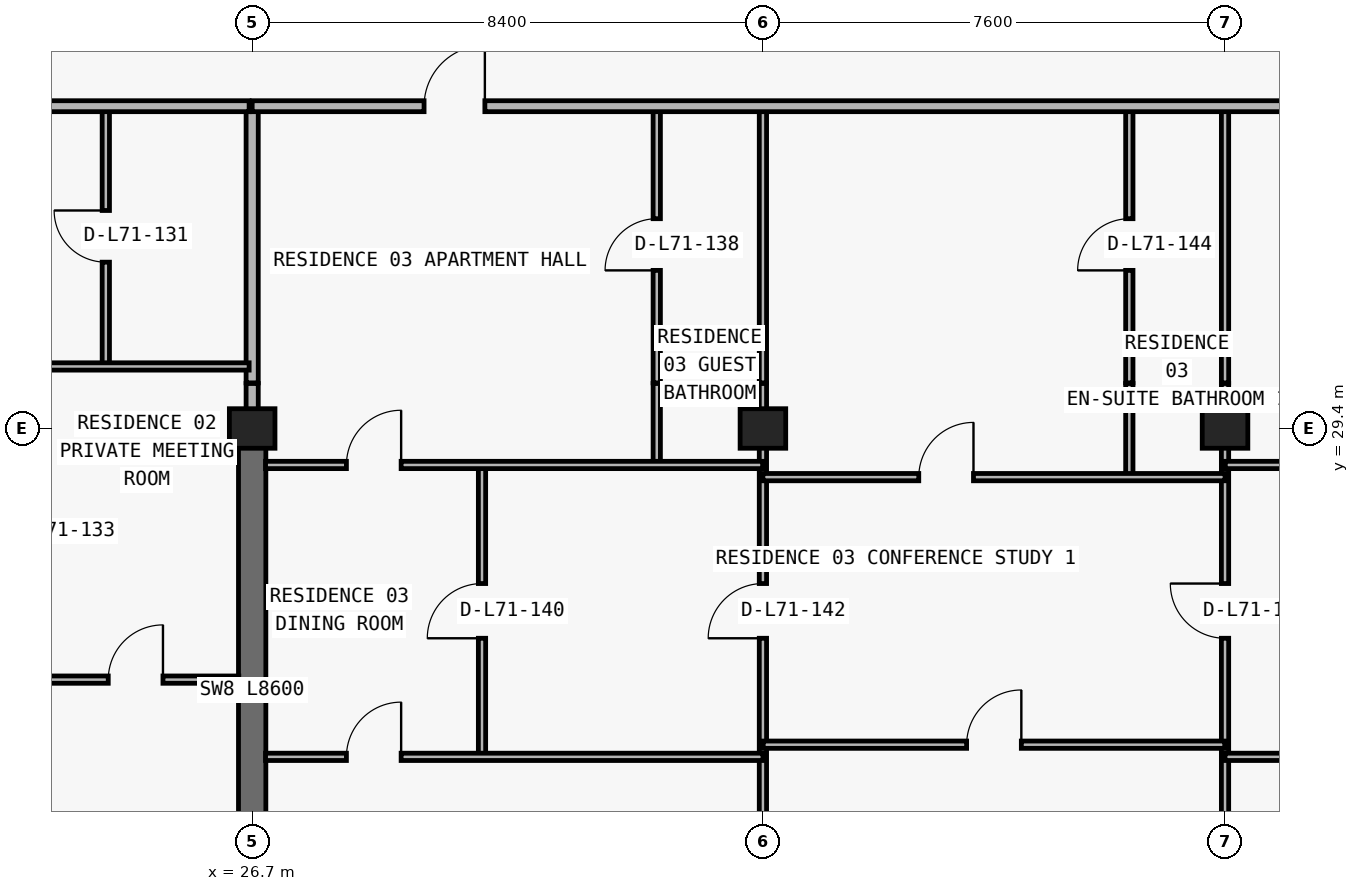
"""IFC4 building model, lengths in metres.
Left out: names, types, materials, properties, quantities, classifications, styles, units other than length and angle.
Written with IfcOpenShell. Run it as: python <this file> out.ifc"""

import sys

from ifc_helpers import new_model, si_unit, direction, frame, frame_2d, origin, origin_2d, place, context, subcontext, project, spatial, rectangle, extrude, element, fill, save


model = new_model("IFC4")
c1 = context("Model", 3, precision=1e-05, world=origin(), true_north=direction((0.0, 1.0)))
c2 = subcontext(c1, "Body", "Model", "MODEL_VIEW")
j1 = project(units=[si_unit("LENGTHUNIT", "METRE"), si_unit("PLANEANGLEUNIT", "RADIAN")], contexts=[c1])
p1 = place(None, origin())
s1 = spatial("IfcSite", under=j1, at=p1, CompositionType="ELEMENT")
p2 = place(p1, origin())
s2 = spatial("IfcBuilding", under=s1, at=p2, CompositionType="ELEMENT")
p3 = place(p2, frame((0.0, 0.0, 252.9)))
s3 = spatial("IfcBuildingStorey", under=s2, at=p3, CompositionType="ELEMENT", Elevation=252.9)
for number, where, z_axis, x_axis in (
    (1, (26.7, 29.4, 0.0), (0.0, 0.0, 1.0), (1.0, 0.0, 0.0)),
    (2, (35.1, 29.4, 0.0), (0.0, 0.0, 1.0), (1.0, 0.0, 0.0)),
    (3, (42.7, 29.4, 0.0), (0.0, 0.0, 1.0), (1.0, 0.0, 0.0)),
):
    element("IfcColumn", number, at=place(p3, frame(where, z_axis=z_axis, x_axis=x_axis)), inside=s3, PredefinedType="COLUMN", context=c2, shape_type="SweptSolid", body=[
        extrude(rectangle(XDim=0.75, YDim=0.65, at=origin_2d()), origin(), (0.0, 0.0, 1.0), 3.05),
    ])
p4 = place(p3, frame((26.7, 20.8, 0.0), z_axis=(0.0, 0.0, 1.0), x_axis=(0.0, 1.0, 0.0)))
e4 = element("IfcWall", 4, at=p4, inside=s3, PredefinedType="SHEAR", context=c2, shape_type="SweptSolid", body=[
    extrude(rectangle(XDim=8.6, YDim=0.45, at=frame_2d((4.3, 0.0))), origin(), (0.0, 0.0, 1.0), 3.05),
])
p5 = place(p3, frame((24.293, 30.42, 0.0), z_axis=(0.0, 0.0, 1.0), x_axis=(0.0, 1.0, 0.0)))
e5 = element("IfcWall", 5, at=p5, inside=s3, PredefinedType="PARTITIONING", context=c2, shape_type="SweptSolid", body=[
    extrude(rectangle(XDim=4.28, YDim=0.12, at=frame_2d((2.14, 0.0))), origin(), (0.0, 0.0, 1.0), 3.05),
])
p6 = place(p5, frame((1.715, 0.0, 0.0)))
e6 = element("IfcOpeningElement", 6, at=p6, cuts=e5, PredefinedType="OPENING", context=c2, shape_type="SweptSolid", body=[
    extrude(rectangle(XDim=0.85, YDim=2.1, at=frame_2d((0.425, 1.05))), frame((0.0, 0.07, 0.0), z_axis=(0.0, -1.0, 0.0), x_axis=(1.0, 0.0, 0.0)), (0.0, 0.0, 1.0), 0.14),
])
p7 = place(p3, frame((26.7, 29.405, 0.0), z_axis=(0.0, 0.0, 1.0), x_axis=(0.0, 1.0, 0.0)))
e7 = element("IfcWall", 7, at=p7, inside=s3, PredefinedType="PARTITIONING", context=c2, shape_type="SweptSolid", body=[
    extrude(rectangle(XDim=0.735, YDim=0.2, at=frame_2d((0.367, 0.0))), origin(), (0.0, 0.0, 1.0), 2.335),
])
p8 = place(p3, frame((26.7, 30.15, 0.0), z_axis=(0.0, 0.0, 1.0), x_axis=(0.0, 1.0, 0.0)))
e8 = element("IfcWall", 8, at=p8, inside=s3, PredefinedType="PARTITIONING", context=c2, shape_type="SweptSolid", body=[
    extrude(rectangle(XDim=4.55, YDim=0.2, at=frame_2d((2.275, 0.0))), origin(), (0.0, 0.0, 1.0), 2.335),
])
p9 = place(p3, frame((30.48, 24.0, 0.0), z_axis=(0.0, 0.0, 1.0), x_axis=(0.0, 1.0, 0.0)))
e9 = element("IfcWall", 9, at=p9, inside=s3, PredefinedType="PARTITIONING", context=c2, shape_type="SweptSolid", body=[
    extrude(rectangle(XDim=4.8, YDim=0.12, at=frame_2d((2.4, 0.0))), origin(), (0.0, 0.0, 1.0), 3.05),
])
p10 = place(p9, frame((1.95, 0.0, 0.0)))
e10 = element("IfcOpeningElement", 10, at=p10, cuts=e9, PredefinedType="OPENING", context=c2, shape_type="SweptSolid", body=[
    extrude(rectangle(XDim=0.9, YDim=2.15, at=frame_2d((0.45, 1.075))), frame((0.0, 0.07, 0.0), z_axis=(0.0, -1.0, 0.0), x_axis=(1.0, 0.0, 0.0)), (0.0, 0.0, 1.0), 0.14),
])
p11 = place(p3, frame((33.354, 28.8, 0.0), z_axis=(0.0, 0.0, 1.0), x_axis=(0.0, 1.0, 0.0)))
e11 = element("IfcWall", 11, at=p11, inside=s3, PredefinedType="PARTITIONING", context=c2, shape_type="SweptSolid", body=[
    extrude(rectangle(XDim=1.34, YDim=0.12, at=frame_2d((0.67, 0.0))), origin(), (0.0, 0.0, 1.0), 3.05),
])
p12 = place(p3, frame((33.354, 30.15, 0.0), z_axis=(0.0, 0.0, 1.0), x_axis=(0.0, 1.0, 0.0)))
e12 = element("IfcWall", 12, at=p12, inside=s3, PredefinedType="PARTITIONING", context=c2, shape_type="SweptSolid", body=[
    extrude(rectangle(XDim=4.55, YDim=0.12, at=frame_2d((2.275, 0.0))), origin(), (0.0, 0.0, 1.0), 3.05),
])
p13 = place(p12, frame((1.85, 0.0, 0.0)))
e13 = element("IfcOpeningElement", 13, at=p13, cuts=e12, PredefinedType="OPENING", context=c2, shape_type="SweptSolid", body=[
    extrude(rectangle(XDim=0.85, YDim=2.1, at=frame_2d((0.425, 1.05))), frame((0.0, 0.07, 0.0), z_axis=(0.0, -1.0, 0.0), x_axis=(1.0, 0.0, 0.0)), (0.0, 0.0, 1.0), 0.14),
])
p14 = place(p3, frame((35.1, 13.34, 0.0), z_axis=(0.0, 0.0, 1.0), x_axis=(0.0, 1.0, 0.0)))
e14 = element("IfcWall", 14, at=p14, inside=s3, PredefinedType="PARTITIONING", context=c2, shape_type="SweptSolid", body=[
    extrude(rectangle(XDim=16.8, YDim=0.12, at=frame_2d((8.4, 0.0))), origin(), (0.0, 0.0, 1.0), 2.263),
])
p15 = place(p14, frame((12.61, 0.0, 0.0)))
e15 = element("IfcOpeningElement", 15, at=p15, cuts=e14, PredefinedType="OPENING", context=c2, shape_type="SweptSolid", body=[
    extrude(rectangle(XDim=0.9, YDim=2.15, at=frame_2d((0.45, 1.075))), frame((0.0, 0.07, 0.0), z_axis=(0.0, -1.0, 0.0), x_axis=(1.0, 0.0, 0.0)), (0.0, 0.0, 1.0), 0.14),
])
p16 = place(p3, frame((35.1, 30.15, 0.0), z_axis=(0.0, 0.0, 1.0), x_axis=(0.0, 1.0, 0.0)))
e16 = element("IfcWall", 16, at=p16, inside=s3, PredefinedType="PARTITIONING", context=c2, shape_type="SweptSolid", body=[
    extrude(rectangle(XDim=4.55, YDim=0.12, at=frame_2d((2.275, 0.0))), origin(), (0.0, 0.0, 1.0), 2.263),
])
p17 = place(p3, frame((41.126, 28.6, 0.0), z_axis=(0.0, 0.0, 1.0), x_axis=(0.0, 1.0, 0.0)))
e17 = element("IfcWall", 17, at=p17, inside=s3, PredefinedType="PARTITIONING", context=c2, shape_type="SweptSolid", body=[
    extrude(rectangle(XDim=1.54, YDim=0.12, at=frame_2d((0.77, 0.0))), origin(), (0.0, 0.0, 1.0), 3.05),
])
p18 = place(p3, frame((41.126, 30.15, 0.0), z_axis=(0.0, 0.0, 1.0), x_axis=(0.0, 1.0, 0.0)))
e18 = element("IfcWall", 18, at=p18, inside=s3, PredefinedType="PARTITIONING", context=c2, shape_type="SweptSolid", body=[
    extrude(rectangle(XDim=4.55, YDim=0.12, at=frame_2d((2.275, 0.0))), origin(), (0.0, 0.0, 1.0), 3.05),
])
p19 = place(p18, frame((1.85, 0.0, 0.0)))
e19 = element("IfcOpeningElement", 19, at=p19, cuts=e18, PredefinedType="OPENING", context=c2, shape_type="SweptSolid", body=[
    extrude(rectangle(XDim=0.85, YDim=2.1, at=frame_2d((0.425, 1.05))), frame((0.0, 0.07, 0.0), z_axis=(0.0, -1.0, 0.0), x_axis=(1.0, 0.0, 0.0)), (0.0, 0.0, 1.0), 0.14),
])
p20 = place(p3, frame((42.7, 13.34, 0.0), z_axis=(0.0, 0.0, 1.0), x_axis=(0.0, 1.0, 0.0)))
e20 = element("IfcWall", 20, at=p20, inside=s3, PredefinedType="PARTITIONING", context=c2, shape_type="SweptSolid", body=[
    extrude(rectangle(XDim=16.8, YDim=0.12, at=frame_2d((8.4, 0.0))), origin(), (0.0, 0.0, 1.0), 2.263),
])
p21 = place(p20, frame((12.61, 0.0, 0.0)))
e21 = element("IfcOpeningElement", 21, at=p21, cuts=e20, PredefinedType="OPENING", context=c2, shape_type="SweptSolid", body=[
    extrude(rectangle(XDim=0.9, YDim=2.15, at=frame_2d((0.45, 1.075))), frame((0.0, 0.07, 0.0), z_axis=(0.0, -1.0, 0.0), x_axis=(1.0, 0.0, 0.0)), (0.0, 0.0, 1.0), 0.14),
])
p22 = place(p3, frame((42.7, 30.15, 0.0), z_axis=(0.0, 0.0, 1.0), x_axis=(0.0, 1.0, 0.0)))
e22 = element("IfcWall", 22, at=p22, inside=s3, PredefinedType="PARTITIONING", context=c2, shape_type="SweptSolid", body=[
    extrude(rectangle(XDim=4.55, YDim=0.12, at=frame_2d((2.275, 0.0))), origin(), (0.0, 0.0, 1.0), 2.263),
])
p23 = place(p3, frame((26.92, 24.0, 0.0), z_axis=(0.0, 0.0, 1.0), x_axis=(1.0, 0.0, 0.0)))
e23 = element("IfcWall", 23, at=p23, inside=s3, PredefinedType="PARTITIONING", context=c2, shape_type="SweptSolid", body=[
    extrude(rectangle(XDim=8.18, YDim=0.12, at=frame_2d((4.09, 0.0))), origin(), (0.0, 0.0, 1.0), 3.05),
])
p24 = place(p23, frame((1.33, 0.0, 0.0)))
e24 = element("IfcOpeningElement", 24, at=p24, cuts=e23, PredefinedType="OPENING", context=c2, shape_type="SweptSolid", body=[
    extrude(rectangle(XDim=0.9, YDim=2.15, at=frame_2d((0.45, 1.075))), frame((0.0, 0.07, 0.0), z_axis=(0.0, -1.0, 0.0), x_axis=(1.0, 0.0, 0.0)), (0.0, 0.0, 1.0), 0.14),
])
p25 = place(p3, frame((42.7, 24.0, 0.0), z_axis=(0.0, 0.0, 1.0), x_axis=(1.0, 0.0, 0.0)))
e25 = element("IfcWall", 25, at=p25, inside=s3, PredefinedType="PARTITIONING", context=c2, shape_type="SweptSolid", body=[
    extrude(rectangle(XDim=8.18, YDim=0.12, at=frame_2d((4.09, 0.0))), origin(), (0.0, 0.0, 1.0), 3.05),
])
p26 = place(p25, frame((3.64, 0.0, 0.0)))
e26 = element("IfcOpeningElement", 26, at=p26, cuts=e25, PredefinedType="OPENING", context=c2, shape_type="SweptSolid", body=[
    extrude(rectangle(XDim=0.9, YDim=2.15, at=frame_2d((0.45, 1.075))), frame((0.0, 0.07, 0.0), z_axis=(0.0, -1.0, 0.0), x_axis=(1.0, 0.0, 0.0)), (0.0, 0.0, 1.0), 0.14),
])
p27 = place(p3, frame((35.105, 24.2, 0.0), z_axis=(0.0, 0.0, 1.0), x_axis=(1.0, 0.0, 0.0)))
e27 = element("IfcWall", 27, at=p27, inside=s3, PredefinedType="PARTITIONING", context=c2, shape_type="SweptSolid", body=[
    extrude(rectangle(XDim=7.59, YDim=0.12, at=frame_2d((3.795, 0.0))), origin(), (0.0, 0.0, 1.0), 3.05),
])
p28 = place(p27, frame((3.345, 0.0, 0.0)))
e28 = element("IfcOpeningElement", 28, at=p28, cuts=e27, PredefinedType="OPENING", context=c2, shape_type="SweptSolid", body=[
    extrude(rectangle(XDim=0.9, YDim=2.15, at=frame_2d((0.45, 1.075))), frame((0.0, 0.07, 0.0), z_axis=(0.0, -1.0, 0.0), x_axis=(1.0, 0.0, 0.0)), (0.0, 0.0, 1.0), 0.14),
])
p29 = place(p3, frame((18.3, 25.27, 0.0), z_axis=(0.0, 0.0, 1.0), x_axis=(1.0, 0.0, 0.0)))
e29 = element("IfcWall", 29, at=p29, inside=s3, PredefinedType="PARTITIONING", context=c2, shape_type="SweptSolid", body=[
    extrude(rectangle(XDim=8.18, YDim=0.12, at=frame_2d((4.09, 0.0))), origin(), (0.0, 0.0, 1.0), 3.05),
])
p30 = place(p29, frame((1.86, 0.0, 0.0)))
e30 = element("IfcOpeningElement", 30, at=p30, cuts=e29, PredefinedType="OPENING", context=c2, shape_type="SweptSolid", body=[
    extrude(rectangle(XDim=0.9, YDim=2.15, at=frame_2d((0.45, 1.075))), frame((0.0, 0.07, 0.0), z_axis=(0.0, -1.0, 0.0), x_axis=(1.0, 0.0, 0.0)), (0.0, 0.0, 1.0), 0.14),
])
p31 = place(p29, frame((6.033, 0.0, 0.0)))
e31 = element("IfcOpeningElement", 31, at=p31, cuts=e29, PredefinedType="OPENING", context=c2, shape_type="SweptSolid", body=[
    extrude(rectangle(XDim=0.9, YDim=2.15, at=frame_2d((0.45, 1.075))), frame((0.0, 0.07, 0.0), z_axis=(0.0, -1.0, 0.0), x_axis=(1.0, 0.0, 0.0)), (0.0, 0.0, 1.0), 0.14),
])
p32 = place(p3, frame((35.1, 28.6, 0.0), z_axis=(0.0, 0.0, 1.0), x_axis=(1.0, 0.0, 0.0)))
e32 = element("IfcWall", 32, at=p32, inside=s3, PredefinedType="PARTITIONING", context=c2, shape_type="SweptSolid", body=[
    extrude(rectangle(XDim=7.6, YDim=0.12, at=frame_2d((3.8, 0.0))), origin(), (0.0, 0.0, 1.0), 3.05),
])
p33 = place(p32, frame((2.563, 0.0, 0.0)))
e33 = element("IfcOpeningElement", 33, at=p33, cuts=e32, PredefinedType="OPENING", context=c2, shape_type="SweptSolid", body=[
    extrude(rectangle(XDim=0.9, YDim=2.15, at=frame_2d((0.45, 1.075))), frame((0.0, 0.07, 0.0), z_axis=(0.0, -1.0, 0.0), x_axis=(1.0, 0.0, 0.0)), (0.0, 0.0, 1.0), 0.14),
])
p34 = place(p3, frame((26.92, 28.8, 0.0), z_axis=(0.0, 0.0, 1.0), x_axis=(1.0, 0.0, 0.0)))
e34 = element("IfcWall", 34, at=p34, inside=s3, PredefinedType="PARTITIONING", context=c2, shape_type="SweptSolid", body=[
    extrude(rectangle(XDim=8.175, YDim=0.12, at=frame_2d((4.087, 0.0))), origin(), (0.0, 0.0, 1.0), 3.05),
])
p35 = place(p34, frame((1.33, 0.0, 0.0)))
e35 = element("IfcOpeningElement", 35, at=p35, cuts=e34, PredefinedType="OPENING", context=c2, shape_type="SweptSolid", body=[
    extrude(rectangle(XDim=0.9, YDim=2.15, at=frame_2d((0.45, 1.075))), frame((0.0, 0.07, 0.0), z_axis=(0.0, -1.0, 0.0), x_axis=(1.0, 0.0, 0.0)), (0.0, 0.0, 1.0), 0.14),
])
p36 = place(p3, frame((42.705, 28.8, 0.0), z_axis=(0.0, 0.0, 1.0), x_axis=(1.0, 0.0, 0.0)))
e36 = element("IfcWall", 36, at=p36, inside=s3, PredefinedType="PARTITIONING", context=c2, shape_type="SweptSolid", body=[
    extrude(rectangle(XDim=8.175, YDim=0.12, at=frame_2d((4.087, 0.0))), origin(), (0.0, 0.0, 1.0), 3.05),
])
p37 = place(p36, frame((2.892, 0.0, 0.0)))
e37 = element("IfcOpeningElement", 37, at=p37, cuts=e36, PredefinedType="OPENING", context=c2, shape_type="SweptSolid", body=[
    extrude(rectangle(XDim=0.9, YDim=2.15, at=frame_2d((0.45, 1.075))), frame((0.0, 0.07, 0.0), z_axis=(0.0, -1.0, 0.0), x_axis=(1.0, 0.0, 0.0)), (0.0, 0.0, 1.0), 0.14),
])
p38 = place(p3, frame((18.3, 30.42, 0.0), z_axis=(0.0, 0.0, 1.0), x_axis=(1.0, 0.0, 0.0)))
e38 = element("IfcWall", 38, at=p38, inside=s3, PredefinedType="PARTITIONING", context=c2, shape_type="SweptSolid", body=[
    extrude(rectangle(XDim=8.35, YDim=0.12, at=frame_2d((4.175, 0.0))), origin(), (0.0, 0.0, 1.0), 3.05),
])
p39 = place(p38, frame((1.943, 0.0, 0.0)))
e39 = element("IfcOpeningElement", 39, at=p39, cuts=e38, PredefinedType="OPENING", context=c2, shape_type="SweptSolid", body=[
    extrude(rectangle(XDim=0.9, YDim=2.15, at=frame_2d((0.45, 1.075))), frame((0.0, 0.07, 0.0), z_axis=(0.0, -1.0, 0.0), x_axis=(1.0, 0.0, 0.0)), (0.0, 0.0, 1.0), 0.14),
])
p40 = place(p3, frame((12.105, 34.7, 0.0), z_axis=(0.0, 0.0, 1.0), x_axis=(1.0, 0.0, 0.0)))
e40 = element("IfcWall", 40, at=p40, inside=s3, PredefinedType="PARTITIONING", context=c2, shape_type="SweptSolid", body=[
    extrude(rectangle(XDim=14.545, YDim=0.18, at=frame_2d((7.272, 0.0))), origin(), (0.0, 0.0, 1.0), 3.05),
])
p41 = place(p40, frame((1.545, 0.0, 0.0)))
e41 = element("IfcOpeningElement", 41, at=p41, cuts=e40, PredefinedType="OPENING", context=c2, shape_type="SweptSolid", body=[
    extrude(rectangle(XDim=1.0, YDim=2.2, at=frame_2d((0.5, 1.1))), frame((0.0, 0.1, 0.0), z_axis=(0.0, -1.0, 0.0), x_axis=(1.0, 0.0, 0.0)), (0.0, 0.0, 1.0), 0.2),
])
p42 = place(p40, frame((8.691, 0.0, 0.0)))
e42 = element("IfcOpeningElement", 42, at=p42, cuts=e40, PredefinedType="OPENING", context=c2, shape_type="SweptSolid", body=[
    extrude(rectangle(XDim=1.0, YDim=2.2, at=frame_2d((0.5, 1.1))), frame((0.0, 0.1, 0.0), z_axis=(0.0, -1.0, 0.0), x_axis=(1.0, 0.0, 0.0)), (0.0, 0.0, 1.0), 0.2),
])
p43 = place(p3, frame((26.7, 34.7, 0.0), z_axis=(0.0, 0.0, 1.0), x_axis=(1.0, 0.0, 0.0)))
e43 = element("IfcWall", 43, at=p43, inside=s3, PredefinedType="PARTITIONING", context=c2, shape_type="SweptSolid", body=[
    extrude(rectangle(XDim=39.0, YDim=0.18, at=frame_2d((19.5, 0.0))), origin(), (0.0, 0.0, 1.0), 3.05),
])
p44 = place(p43, frame((2.827, 0.0, 0.0)))
e44 = element("IfcOpeningElement", 44, at=p44, cuts=e43, PredefinedType="OPENING", context=c2, shape_type="SweptSolid", body=[
    extrude(rectangle(XDim=1.0, YDim=2.2, at=frame_2d((0.5, 1.1))), frame((0.0, 0.1, 0.0), z_axis=(0.0, -1.0, 0.0), x_axis=(1.0, 0.0, 0.0)), (0.0, 0.0, 1.0), 0.2),
])
p45 = place(p43, frame((27.27, 0.0, 0.0)))
e45 = element("IfcOpeningElement", 45, at=p45, cuts=e43, PredefinedType="OPENING", context=c2, shape_type="SweptSolid", body=[
    extrude(rectangle(XDim=1.0, YDim=2.2, at=frame_2d((0.5, 1.1))), frame((0.0, 0.1, 0.0), z_axis=(0.0, -1.0, 0.0), x_axis=(1.0, 0.0, 0.0)), (0.0, 0.0, 1.0), 0.2),
])
p46 = place(p6, origin())
e46 = element("IfcDoor", 46, at=p46, inside=s3, OperationType="SINGLE_SWING_RIGHT", PredefinedType="DOOR", context=c2, shape_type="SweptSolid", body=[
    extrude(rectangle(XDim=0.85, YDim=2.1, at=frame_2d((0.425, 1.05))), frame((0.0, 0.025, 0.0), z_axis=(0.0, -1.0, 0.0), x_axis=(1.0, 0.0, 0.0)), (0.0, 0.0, 1.0), 0.05),
])
fill(e6, e46)
p47 = place(p31, origin())
e47 = element("IfcDoor", 47, at=p47, inside=s3, OperationType="SINGLE_SWING_RIGHT", PredefinedType="DOOR", context=c2, shape_type="SweptSolid", body=[
    extrude(rectangle(XDim=0.9, YDim=2.15, at=frame_2d((0.45, 1.075))), frame((0.0, 0.025, 0.0), z_axis=(0.0, -1.0, 0.0), x_axis=(1.0, 0.0, 0.0)), (0.0, 0.0, 1.0), 0.05),
])
fill(e31, e47)
p48 = place(p44, origin())
e48 = element("IfcDoor", 48, at=p48, inside=s3, OperationType="SINGLE_SWING_RIGHT", PredefinedType="DOOR", context=c2, shape_type="SweptSolid", body=[
    extrude(rectangle(XDim=1.0, YDim=2.2, at=frame_2d((0.5, 1.1))), frame((0.0, 0.025, 0.0), z_axis=(0.0, -1.0, 0.0), x_axis=(1.0, 0.0, 0.0)), (0.0, 0.0, 1.0), 0.05),
])
fill(e44, e48)
p49 = place(p13, origin())
e49 = element("IfcDoor", 49, at=p49, inside=s3, OperationType="SINGLE_SWING_LEFT", PredefinedType="DOOR", context=c2, shape_type="SweptSolid", body=[
    extrude(rectangle(XDim=0.85, YDim=2.1, at=frame_2d((0.425, 1.05))), frame((0.0, 0.025, 0.0), z_axis=(0.0, -1.0, 0.0), x_axis=(1.0, 0.0, 0.0)), (0.0, 0.0, 1.0), 0.05),
])
fill(e13, e49)
p50 = place(p35, origin())
e50 = element("IfcDoor", 50, at=p50, inside=s3, OperationType="SINGLE_SWING_RIGHT", PredefinedType="DOOR", context=c2, shape_type="SweptSolid", body=[
    extrude(rectangle(XDim=0.9, YDim=2.15, at=frame_2d((0.45, 1.075))), frame((0.0, 0.025, 0.0), z_axis=(0.0, -1.0, 0.0), x_axis=(1.0, 0.0, 0.0)), (0.0, 0.0, 1.0), 0.05),
])
fill(e35, e50)
p51 = place(p10, origin())
e51 = element("IfcDoor", 51, at=p51, inside=s3, OperationType="SINGLE_SWING_LEFT", PredefinedType="DOOR", context=c2, shape_type="SweptSolid", body=[
    extrude(rectangle(XDim=0.9, YDim=2.15, at=frame_2d((0.45, 1.075))), frame((0.0, 0.025, 0.0), z_axis=(0.0, -1.0, 0.0), x_axis=(1.0, 0.0, 0.0)), (0.0, 0.0, 1.0), 0.05),
])
fill(e10, e51)
p52 = place(p24, origin())
e52 = element("IfcDoor", 52, at=p52, inside=s3, OperationType="SINGLE_SWING_RIGHT", PredefinedType="DOOR", context=c2, shape_type="SweptSolid", body=[
    extrude(rectangle(XDim=0.9, YDim=2.15, at=frame_2d((0.45, 1.075))), frame((0.0, 0.025, 0.0), z_axis=(0.0, -1.0, 0.0), x_axis=(1.0, 0.0, 0.0)), (0.0, 0.0, 1.0), 0.05),
])
fill(e24, e52)
p53 = place(p15, origin())
e53 = element("IfcDoor", 53, at=p53, inside=s3, OperationType="SINGLE_SWING_LEFT", PredefinedType="DOOR", context=c2, shape_type="SweptSolid", body=[
    extrude(rectangle(XDim=0.9, YDim=2.15, at=frame_2d((0.45, 1.075))), frame((0.0, 0.025, 0.0), z_axis=(0.0, -1.0, 0.0), x_axis=(1.0, 0.0, 0.0)), (0.0, 0.0, 1.0), 0.05),
])
fill(e15, e53)
p54 = place(p33, origin())
e54 = element("IfcDoor", 54, at=p54, inside=s3, OperationType="SINGLE_SWING_RIGHT", PredefinedType="DOOR", context=c2, shape_type="SweptSolid", body=[
    extrude(rectangle(XDim=0.9, YDim=2.15, at=frame_2d((0.45, 1.075))), frame((0.0, 0.025, 0.0), z_axis=(0.0, -1.0, 0.0), x_axis=(1.0, 0.0, 0.0)), (0.0, 0.0, 1.0), 0.05),
])
fill(e33, e54)
p55 = place(p19, origin())
e55 = element("IfcDoor", 55, at=p55, inside=s3, OperationType="SINGLE_SWING_LEFT", PredefinedType="DOOR", context=c2, shape_type="SweptSolid", body=[
    extrude(rectangle(XDim=0.85, YDim=2.1, at=frame_2d((0.425, 1.05))), frame((0.0, 0.025, 0.0), z_axis=(0.0, -1.0, 0.0), x_axis=(1.0, 0.0, 0.0)), (0.0, 0.0, 1.0), 0.05),
])
fill(e19, e55)
p56 = place(p28, origin())
e56 = element("IfcDoor", 56, at=p56, inside=s3, OperationType="SINGLE_SWING_RIGHT", PredefinedType="DOOR", context=c2, shape_type="SweptSolid", body=[
    extrude(rectangle(XDim=0.9, YDim=2.15, at=frame_2d((0.45, 1.075))), frame((0.0, 0.025, 0.0), z_axis=(0.0, -1.0, 0.0), x_axis=(1.0, 0.0, 0.0)), (0.0, 0.0, 1.0), 0.05),
])
fill(e28, e56)
p57 = place(p21, origin())
e57 = element("IfcDoor", 57, at=p57, inside=s3, OperationType="SINGLE_SWING_RIGHT", PredefinedType="DOOR", context=c2, shape_type="SweptSolid", body=[
    extrude(rectangle(XDim=0.9, YDim=2.15, at=frame_2d((0.45, 1.075))), frame((0.0, 0.025, 0.0), z_axis=(0.0, -1.0, 0.0), x_axis=(1.0, 0.0, 0.0)), (0.0, 0.0, 1.0), 0.05),
])
fill(e21, e57)
save(model, sys.argv[1])
